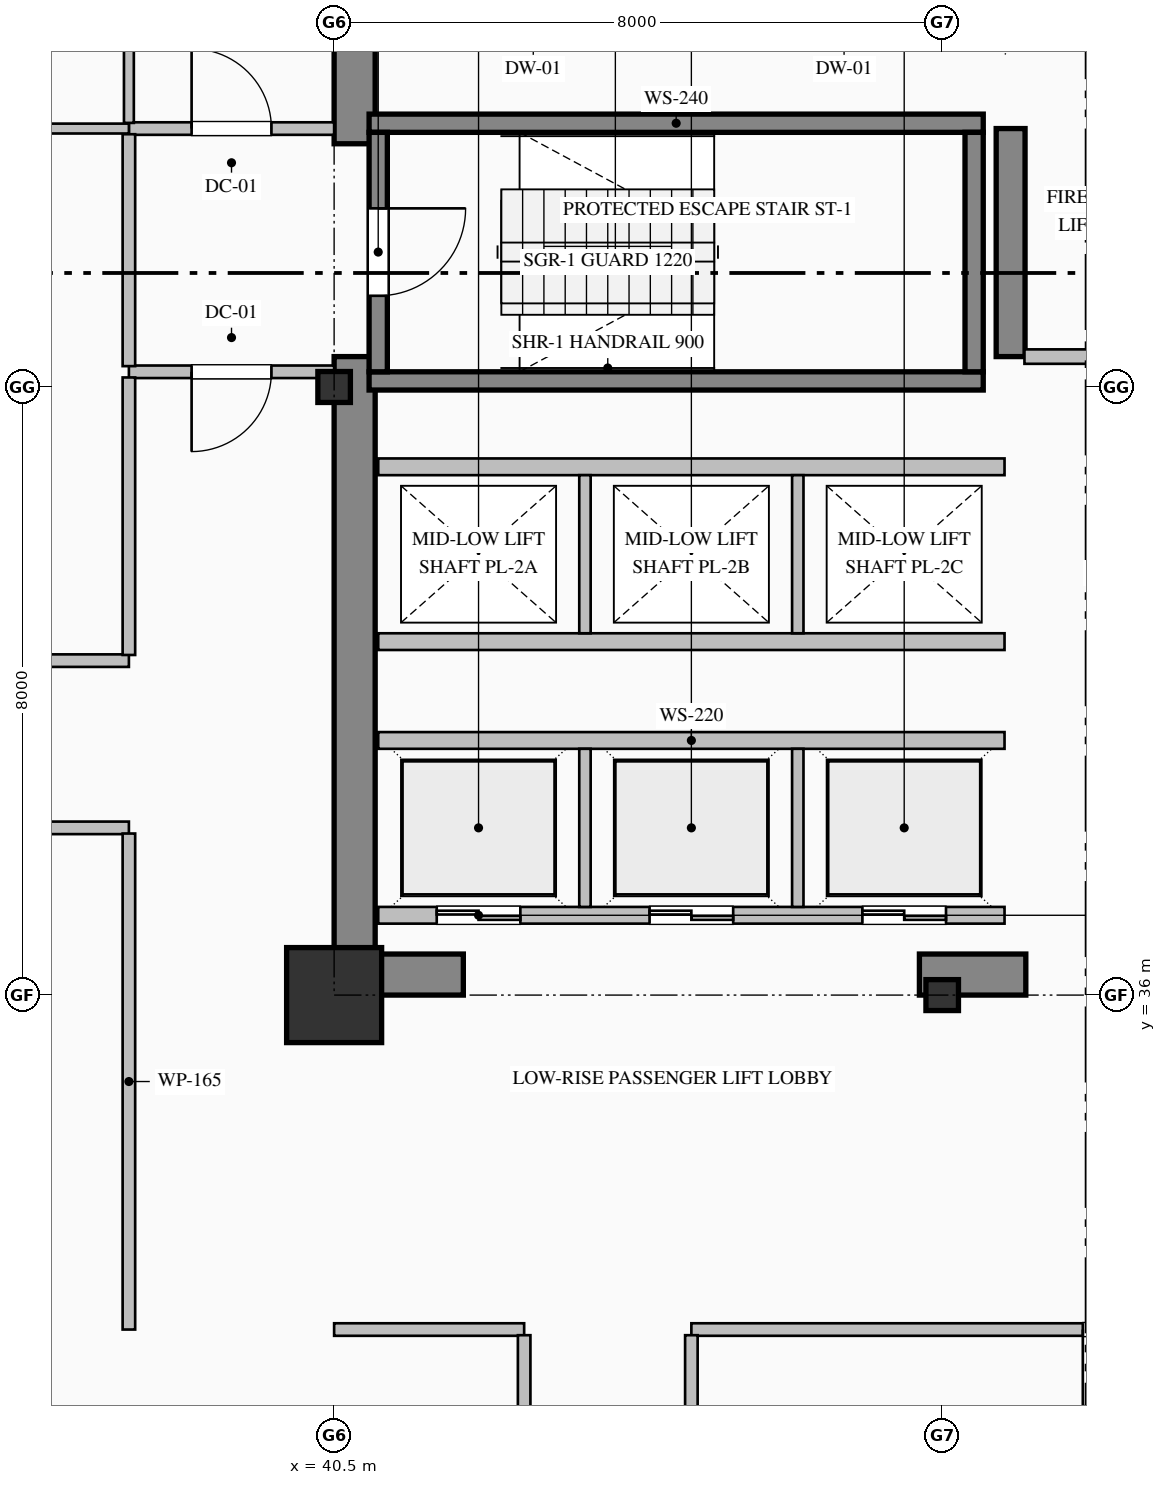
"""IFC4 building model, lengths in metres.
Left out: names, types, materials, properties, quantities, classifications, styles, units other than length and angle.
Written with IfcOpenShell. Run it as: python <this file> out.ifc"""

import sys

from ifc_helpers import new_model, si_unit, direction, frame, frame_2d, origin, origin_2d, place, context, subcontext, project, spatial, rectangle, hollow_rectangle, i_section, extrude, element, fill, save


model = new_model("IFC4")
c1 = context("Model", 3, precision=1e-05, world=origin(), true_north=direction((0.0, 1.0)))
c2 = subcontext(c1, "Body", "Model", "MODEL_VIEW")
j1 = project(units=[si_unit("LENGTHUNIT", "METRE"), si_unit("PLANEANGLEUNIT", "RADIAN")], contexts=[c1])
p1 = place(None, origin())
s1 = spatial("IfcSite", under=j1, at=p1, CompositionType="ELEMENT")
p2 = place(p1, origin())
s2 = spatial("IfcBuilding", under=s1, at=p2, CompositionType="ELEMENT")
p3 = place(p2, frame((0.0, 0.0, 36.2)))
s3 = spatial("IfcBuildingStorey", under=s2, at=p3, CompositionType="ELEMENT", Elevation=36.2)
p4 = place(p3, frame((40.77, 36.54, 0.0), z_axis=(0.0, 0.0, 1.0), x_axis=(0.0, 1.0, 0.0)))
e1 = element("IfcWall", 1, at=p4, inside=s3, PredefinedType="SHEAR", context=c2, shape_type="SweptSolid", body=[
    extrude(rectangle(XDim=7.86, YDim=0.54, at=frame_2d((3.93, 0.0))), origin(), (0.0, 0.0, 1.0), 3.75),
])
p5 = place(p3, frame((40.77, 47.2, 0.0), z_axis=(0.0, 0.0, 1.0), x_axis=(0.0, 1.0, 0.0)))
e2 = element("IfcWall", 2, at=p5, inside=s3, PredefinedType="SHEAR", context=c2, shape_type="SweptSolid", body=[
    extrude(rectangle(XDim=4.26, YDim=0.54, at=frame_2d((2.13, 0.0))), origin(), (0.0, 0.0, 1.0), 3.75),
])
p6 = place(p3, frame((40.5, 36.27, 0.0), z_axis=(0.0, 0.0, 1.0), x_axis=(1.0, 0.0, 0.0)))
e3 = element("IfcWall", 3, at=p6, inside=s3, PredefinedType="SHEAR", context=c2, shape_type="SweptSolid", body=[
    extrude(rectangle(XDim=1.7, YDim=0.54, at=frame_2d((0.85, 0.0))), origin(), (0.0, 0.0, 1.0), 3.75),
])
p7 = place(p3, frame((48.2, 36.27, 0.0), z_axis=(0.0, 0.0, 1.0), x_axis=(1.0, 0.0, 0.0)))
e4 = element("IfcWall", 4, at=p7, inside=s3, PredefinedType="SHEAR", context=c2, shape_type="SweptSolid", body=[
    extrude(rectangle(XDim=1.4, YDim=0.54, at=frame_2d((0.7, 0.0))), origin(), (0.0, 0.0, 1.0), 3.75),
])
p8 = place(p3, frame((49.4, 44.4, 0.0), z_axis=(0.0, 0.0, 1.0), x_axis=(0.0, 1.0, 0.0)))
e5 = element("IfcWall", 5, at=p8, inside=s3, PredefinedType="SHEAR", context=c2, shape_type="SweptSolid", body=[
    extrude(rectangle(XDim=3.0, YDim=0.38, at=frame_2d((1.5, 0.0))), origin(), (0.0, 0.0, 1.0), 3.75),
])
p9 = place(p3, frame((40.5, 36.0, 0.0), z_axis=(0.0, 0.0, 1.0), x_axis=(1.0, 0.0, 0.0)))
e6 = element("IfcColumn", 6, at=p9, inside=s3, PredefinedType="COLUMN", context=c2, shape_type="SweptSolid", body=[
    extrude(hollow_rectangle(XDim=1.25, YDim=1.25, WallThickness=0.045, at=origin_2d()), origin(), (0.0, 0.0, 1.0), 4.0),
])
for number, where, z_axis, x_axis in (
    (7, (40.5, 44.0, 0.0), (0.0, 0.0, 1.0), (1.0, 0.0, 0.0)),
    (8, (48.5, 36.0, 0.0), (0.0, 0.0, 1.0), (1.0, 0.0, 0.0)),
):
    element("IfcColumn", number, at=place(p3, frame(where, z_axis=z_axis, x_axis=x_axis)), inside=s3, PredefinedType="COLUMN", context=c2, shape_type="SweptSolid", body=[
        extrude(i_section(OverallWidth=0.407, OverallDepth=0.428, WebThickness=0.02, FlangeThickness=0.035, FilletRadius=0.022, at=origin_2d()), origin(), (0.0, 0.0, 1.0), 4.0),
    ])
for number, where, z_axis, x_axis in (
    (9, (40.96, 47.47, 0.0), (0.0, 0.0, 1.0), (1.0, 0.0, 0.0)),
    (10, (49.04, 44.08, 0.0), (0.0, 0.0, 1.0), (-1.0, 0.0, 0.0)),
):
    element("IfcWall", number, at=place(p3, frame(where, z_axis=z_axis, x_axis=x_axis)), inside=s3, PredefinedType="SOLIDWALL", context=c2, shape_type="SweptSolid", body=[
        extrude(rectangle(XDim=8.08, YDim=0.24, at=frame_2d((4.04, 0.0))), origin(), (0.0, 0.0, 1.0), 4.0),
    ])
p10 = place(p3, frame((41.08, 47.35, 0.0), z_axis=(0.0, 0.0, 1.0), x_axis=(0.0, -1.0, 0.0)))
e11 = element("IfcWall", 11, at=p10, inside=s3, PredefinedType="SOLIDWALL", context=c2, shape_type="SweptSolid", body=[
    extrude(rectangle(XDim=3.15, YDim=0.24, at=frame_2d((1.575, 0.0))), origin(), (0.0, 0.0, 1.0), 4.0),
])
p11 = place(p10, frame((1.0, 0.0, 0.0)))
e12 = element("IfcOpeningElement", 12, at=p11, cuts=e11, PredefinedType="OPENING", context=c2, shape_type="SweptSolid", body=[
    extrude(rectangle(XDim=1.15, YDim=2.2, at=frame_2d((0.575, 1.1))), frame((0.0, 0.13, 0.0), z_axis=(0.0, -1.0, 0.0), x_axis=(1.0, 0.0, 0.0)), (0.0, 0.0, 1.0), 0.26),
])
p12 = place(p3, frame((48.92, 44.2, 0.0), z_axis=(0.0, 0.0, 1.0), x_axis=(0.0, 1.0, 0.0)))
e13 = element("IfcWall", 13, at=p12, inside=s3, PredefinedType="SOLIDWALL", context=c2, shape_type="SweptSolid", body=[
    extrude(rectangle(XDim=3.15, YDim=0.24, at=frame_2d((1.575, 0.0))), origin(), (0.0, 0.0, 1.0), 4.0),
])
p13 = place(p3, frame((49.32, 37.05, 0.0), z_axis=(0.0, 0.0, 1.0), x_axis=(-1.0, 0.0, 0.0)))
e14 = element("IfcWall", 14, at=p13, inside=s3, PredefinedType="PARTITIONING", context=c2, shape_type="SweptSolid", body=[
    extrude(rectangle(XDim=8.24, YDim=0.22, at=frame_2d((4.12, 0.0))), origin(), (0.0, 0.0, 1.0), 3.75),
])
p14 = place(p13, frame((6.37, 0.0, 0.0)))
e15 = element("IfcOpeningElement", 15, at=p14, cuts=e14, PredefinedType="OPENING", context=c2, shape_type="SweptSolid", body=[
    extrude(rectangle(XDim=1.1, YDim=2.2, at=frame_2d((0.55, 1.1))), frame((0.0, 0.12, 0.0), z_axis=(0.0, -1.0, 0.0), x_axis=(1.0, 0.0, 0.0)), (0.0, 0.0, 1.0), 0.24),
])
p15 = place(p13, frame((3.57, 0.0, 0.0)))
e16 = element("IfcOpeningElement", 16, at=p15, cuts=e14, PredefinedType="OPENING", context=c2, shape_type="SweptSolid", body=[
    extrude(rectangle(XDim=1.1, YDim=2.2, at=frame_2d((0.55, 1.1))), frame((0.0, 0.12, 0.0), z_axis=(0.0, -1.0, 0.0), x_axis=(1.0, 0.0, 0.0)), (0.0, 0.0, 1.0), 0.24),
])
p16 = place(p13, frame((0.77, 0.0, 0.0)))
e17 = element("IfcOpeningElement", 17, at=p16, cuts=e14, PredefinedType="OPENING", context=c2, shape_type="SweptSolid", body=[
    extrude(rectangle(XDim=1.1, YDim=2.2, at=frame_2d((0.55, 1.1))), frame((0.0, 0.12, 0.0), z_axis=(0.0, -1.0, 0.0), x_axis=(1.0, 0.0, 0.0)), (0.0, 0.0, 1.0), 0.24),
])
p17 = place(p3, frame((41.08, 39.35, 0.0), z_axis=(0.0, 0.0, 1.0), x_axis=(1.0, 0.0, 0.0)))
e18 = element("IfcWall", 18, at=p17, inside=s3, PredefinedType="PARTITIONING", context=c2, shape_type="SweptSolid", body=[
    extrude(rectangle(XDim=8.24, YDim=0.22, at=frame_2d((4.12, 0.0))), origin(), (0.0, 0.0, 1.0), 3.75),
])
for number, where, z_axis, x_axis in (
    (19, (43.8, 37.16, 0.0), (0.0, 0.0, 1.0), (0.0, 1.0, 0.0)),
    (20, (46.6, 37.16, 0.0), (0.0, 0.0, 1.0), (0.0, 1.0, 0.0)),
):
    element("IfcWall", number, at=place(p3, frame(where, z_axis=z_axis, x_axis=x_axis)), inside=s3, PredefinedType="PARTITIONING", context=c2, shape_type="SweptSolid", body=[
        extrude(rectangle(XDim=2.08, YDim=0.15, at=frame_2d((1.04, 0.0))), origin(), (0.0, 0.0, 1.0), 3.75),
    ])
for number, where, z_axis, x_axis in (
    (21, (49.32, 40.65, 0.0), (0.0, 0.0, 1.0), (-1.0, 0.0, 0.0)),
    (22, (41.08, 42.95, 0.0), (0.0, 0.0, 1.0), (1.0, 0.0, 0.0)),
):
    element("IfcWall", number, at=place(p3, frame(where, z_axis=z_axis, x_axis=x_axis)), inside=s3, PredefinedType="PARTITIONING", context=c2, shape_type="SweptSolid", body=[
        extrude(rectangle(XDim=8.24, YDim=0.22, at=frame_2d((4.12, 0.0))), origin(), (0.0, 0.0, 1.0), 3.75),
    ])
for number, where, z_axis, x_axis in (
    (23, (43.8, 40.76, 0.0), (0.0, 0.0, 1.0), (0.0, 1.0, 0.0)),
    (24, (46.6, 40.76, 0.0), (0.0, 0.0, 1.0), (0.0, 1.0, 0.0)),
):
    element("IfcWall", number, at=place(p3, frame(where, z_axis=z_axis, x_axis=x_axis)), inside=s3, PredefinedType="PARTITIONING", context=c2, shape_type="SweptSolid", body=[
        extrude(rectangle(XDim=2.08, YDim=0.15, at=frame_2d((1.04, 0.0))), origin(), (0.0, 0.0, 1.0), 3.75),
    ])
p18 = place(p3, frame((37.8, 47.4, 0.0), z_axis=(0.0, 0.0, 1.0), x_axis=(1.0, 0.0, 0.0)))
e25 = element("IfcWall", 25, at=p18, inside=s3, PredefinedType="PARTITIONING", context=c2, shape_type="SweptSolid", body=[
    extrude(rectangle(XDim=2.7, YDim=0.165, at=frame_2d((1.35, 0.0))), origin(), (0.0, 0.0, 1.0), 3.75),
])
p19 = place(p18, frame((0.825, 0.0, 0.0)))
e26 = element("IfcOpeningElement", 26, at=p19, cuts=e25, PredefinedType="OPENING", context=c2, shape_type="SweptSolid", body=[
    extrude(rectangle(XDim=1.05, YDim=2.15, at=frame_2d((0.525, 1.075))), frame((0.0, 0.093, 0.0), z_axis=(0.0, -1.0, 0.0), x_axis=(1.0, 0.0, 0.0)), (0.0, 0.0, 1.0), 0.185),
])
p20 = place(p3, frame((40.5, 44.2, 0.0), z_axis=(0.0, 0.0, 1.0), x_axis=(-1.0, 0.0, 0.0)))
e27 = element("IfcWall", 27, at=p20, inside=s3, PredefinedType="PARTITIONING", context=c2, shape_type="SweptSolid", body=[
    extrude(rectangle(XDim=2.7, YDim=0.165, at=frame_2d((1.35, 0.0))), origin(), (0.0, 0.0, 1.0), 3.75),
])
p21 = place(p20, frame((0.825, 0.0, 0.0)))
e28 = element("IfcOpeningElement", 28, at=p21, cuts=e27, PredefinedType="OPENING", context=c2, shape_type="SweptSolid", body=[
    extrude(rectangle(XDim=1.05, YDim=2.15, at=frame_2d((0.525, 1.075))), frame((0.0, 0.093, 0.0), z_axis=(0.0, -1.0, 0.0), x_axis=(1.0, 0.0, 0.0)), (0.0, 0.0, 1.0), 0.185),
])
p22 = place(p3, frame((37.8, 44.274, 0.0), z_axis=(0.0, 0.0, 1.0), x_axis=(0.0, 1.0, 0.0)))
e29 = element("IfcWall", 29, at=p22, inside=s3, PredefinedType="PARTITIONING", context=c2, shape_type="SweptSolid", body=[
    extrude(rectangle(XDim=3.051, YDim=0.165, at=frame_2d((1.525, 0.0))), origin(), (0.0, 0.0, 1.0), 3.75),
])
p23 = place(p3, frame((37.8, 47.475, 0.0), z_axis=(0.0, 0.0, 1.0), x_axis=(0.0, 1.0, 0.0)))
e30 = element("IfcWall", 30, at=p23, inside=s3, PredefinedType="PARTITIONING", context=c2, shape_type="SweptSolid", body=[
    extrude(rectangle(XDim=4.173, YDim=0.13, at=frame_2d((2.087, 0.0))), origin(), (0.0, 0.0, 1.0), 3.75),
])
p24 = place(p23, frame((1.577, 0.0, 0.0)))
e31 = element("IfcOpeningElement", 31, at=p24, cuts=e30, PredefinedType="OPENING", context=c2, shape_type="SweptSolid", body=[
    extrude(rectangle(XDim=1.02, YDim=2.15, at=frame_2d((0.51, 1.075))), frame((0.0, 0.075, 0.0), z_axis=(0.0, -1.0, 0.0), x_axis=(1.0, 0.0, 0.0)), (0.0, 0.0, 1.0), 0.15),
])
p25 = place(p3, frame((37.8, 47.4, 0.0), z_axis=(0.0, 0.0, 1.0), x_axis=(-1.0, 0.0, 0.0)))
e32 = element("IfcWall", 32, at=p25, inside=s3, PredefinedType="PARTITIONING", context=c2, shape_type="SweptSolid", body=[
    extrude(rectangle(XDim=2.4, YDim=0.13, at=frame_2d((1.2, 0.0))), origin(), (0.0, 0.0, 1.0), 3.75),
])
p26 = place(p3, frame((54.718, 44.4, 0.0), z_axis=(0.0, 0.0, 1.0), x_axis=(-1.0, 0.0, 0.0)))
e33 = element("IfcWall", 33, at=p26, inside=s3, PredefinedType="PARTITIONING", context=c2, shape_type="SweptSolid", body=[
    extrude(rectangle(XDim=5.136, YDim=0.19, at=frame_2d((2.568, 0.0))), origin(), (0.0, 0.0, 1.0), 3.75),
])
p27 = place(p26, frame((2.043, 0.0, 0.0)))
e34 = element("IfcOpeningElement", 34, at=p27, cuts=e33, PredefinedType="OPENING", context=c2, shape_type="SweptSolid", body=[
    extrude(rectangle(XDim=1.05, YDim=2.15, at=frame_2d((0.525, 1.075))), frame((0.0, 0.105, 0.0), z_axis=(0.0, -1.0, 0.0), x_axis=(1.0, 0.0, 0.0)), (0.0, 0.0, 1.0), 0.21),
])
p28 = place(p3, frame((37.8, 38.2, 0.0), z_axis=(0.0, 0.0, 1.0), x_axis=(-1.0, 0.0, 0.0)))
e35 = element("IfcWall", 35, at=p28, inside=s3, PredefinedType="PARTITIONING", context=c2, shape_type="SweptSolid", body=[
    extrude(rectangle(XDim=28.8, YDim=0.165, at=frame_2d((14.4, 0.0))), origin(), (0.0, 0.0, 1.0), 3.75),
])
p29 = place(p28, frame((13.9, 0.0, 0.0)))
e36 = element("IfcOpeningElement", 36, at=p29, cuts=e35, PredefinedType="OPENING", context=c2, shape_type="SweptSolid", body=[
    extrude(rectangle(XDim=1.0, YDim=2.15, at=frame_2d((0.5, 1.075))), frame((0.0, 0.093, 0.0), z_axis=(0.0, -1.0, 0.0), x_axis=(1.0, 0.0, 0.0)), (0.0, 0.0, 1.0), 0.185),
])
p30 = place(p3, frame((32.5, 40.4, 0.0), z_axis=(0.0, 0.0, 1.0), x_axis=(1.0, 0.0, 0.0)))
e37 = element("IfcWall", 37, at=p30, inside=s3, PredefinedType="PARTITIONING", context=c2, shape_type="SweptSolid", body=[
    extrude(rectangle(XDim=5.3, YDim=0.165, at=frame_2d((2.65, 0.0))), origin(), (0.0, 0.0, 1.0), 3.75),
])
p31 = place(p30, frame((2.15, 0.0, 0.0)))
e38 = element("IfcOpeningElement", 38, at=p31, cuts=e37, PredefinedType="OPENING", context=c2, shape_type="SweptSolid", body=[
    extrude(rectangle(XDim=1.0, YDim=2.15, at=frame_2d((0.5, 1.075))), frame((0.0, 0.093, 0.0), z_axis=(0.0, -1.0, 0.0), x_axis=(1.0, 0.0, 0.0)), (0.0, 0.0, 1.0), 0.185),
])
p32 = place(p3, frame((37.8, 31.6, 0.0), z_axis=(0.0, 0.0, 1.0), x_axis=(0.0, 1.0, 0.0)))
e39 = element("IfcWall", 39, at=p32, inside=s3, PredefinedType="PARTITIONING", context=c2, shape_type="SweptSolid", body=[
    extrude(rectangle(XDim=6.525, YDim=0.165, at=frame_2d((3.263, 0.0))), origin(), (0.0, 0.0, 1.0), 3.75),
])
p33 = place(p3, frame((37.8, 40.475, 0.0), z_axis=(0.0, 0.0, 1.0), x_axis=(0.0, 1.0, 0.0)))
e40 = element("IfcWall", 40, at=p33, inside=s3, PredefinedType="PARTITIONING", context=c2, shape_type="SweptSolid", body=[
    extrude(rectangle(XDim=3.651, YDim=0.165, at=frame_2d((1.825, 0.0))), origin(), (0.0, 0.0, 1.0), 3.75),
])
p34 = place(p3, frame((56.5, 31.6, 0.0), z_axis=(0.0, 0.0, 1.0), x_axis=(-1.0, 0.0, 0.0)))
e41 = element("IfcWall", 41, at=p34, inside=s3, PredefinedType="PARTITIONING", context=c2, shape_type="SweptSolid", body=[
    extrude(rectangle(XDim=11.3, YDim=0.165, at=frame_2d((5.65, 0.0))), origin(), (0.0, 0.0, 1.0), 3.75),
])
p35 = place(p34, frame((5.15, 0.0, 0.0)))
e42 = element("IfcOpeningElement", 42, at=p35, cuts=e41, PredefinedType="OPENING", context=c2, shape_type="SweptSolid", body=[
    extrude(rectangle(XDim=1.0, YDim=2.15, at=frame_2d((0.5, 1.075))), frame((0.0, 0.093, 0.0), z_axis=(0.0, -1.0, 0.0), x_axis=(1.0, 0.0, 0.0)), (0.0, 0.0, 1.0), 0.185),
])
p36 = place(p3, frame((43.0, 31.6, 0.0), z_axis=(0.0, 0.0, 1.0), x_axis=(-1.0, 0.0, 0.0)))
e43 = element("IfcWall", 43, at=p36, inside=s3, PredefinedType="PARTITIONING", context=c2, shape_type="SweptSolid", body=[
    extrude(rectangle(XDim=2.5, YDim=0.165, at=frame_2d((1.25, 0.0))), origin(), (0.0, 0.0, 1.0), 3.75),
])
p37 = place(p3, frame((45.2, 31.525, 0.0), z_axis=(0.0, 0.0, 1.0), x_axis=(0.0, -1.0, 0.0)))
e44 = element("IfcWall", 44, at=p37, inside=s3, PredefinedType="PARTITIONING", context=c2, shape_type="SweptSolid", body=[
    extrude(rectangle(XDim=3.461, YDim=0.165, at=frame_2d((1.73, 0.0))), origin(), (0.0, 0.0, 1.0), 3.75),
])
p38 = place(p3, frame((43.0, 28.064, 0.0), z_axis=(0.0, 0.0, 1.0), x_axis=(0.0, 1.0, 0.0)))
e45 = element("IfcWall", 45, at=p38, inside=s3, PredefinedType="PARTITIONING", context=c2, shape_type="SweptSolid", body=[
    extrude(rectangle(XDim=3.461, YDim=0.165, at=frame_2d((1.73, 0.0))), origin(), (0.0, 0.0, 1.0), 3.75),
])
p39 = place(p38, frame((1.23, 0.0, 0.0)))
e46 = element("IfcOpeningElement", 46, at=p39, cuts=e45, PredefinedType="OPENING", context=c2, shape_type="SweptSolid", body=[
    extrude(rectangle(XDim=1.0, YDim=2.15, at=frame_2d((0.5, 1.075))), frame((0.0, 0.093, 0.0), z_axis=(0.0, -1.0, 0.0), x_axis=(1.0, 0.0, 0.0)), (0.0, 0.0, 1.0), 0.185),
])
p40 = place(p11, origin())
e47 = element("IfcDoor", 47, at=p40, inside=s3, OperationType="SINGLE_SWING_LEFT", PredefinedType="DOOR", context=c2, shape_type="SweptSolid", body=[
    extrude(rectangle(XDim=1.15, YDim=2.2, at=frame_2d((0.575, 1.1))), frame((0.0, 0.025, 0.0), z_axis=(0.0, -1.0, 0.0), x_axis=(1.0, 0.0, 0.0)), (0.0, 0.0, 1.0), 0.05),
])
fill(e12, e47)
p41 = place(p14, origin())
e48 = element("IfcDoor", 48, at=p41, inside=s3, OperationType="DOUBLE_DOOR_SLIDING", PredefinedType="DOOR", context=c2, shape_type="SweptSolid", body=[
    extrude(rectangle(XDim=1.1, YDim=2.2, at=frame_2d((0.55, 1.1))), frame((0.0, 0.025, 0.0), z_axis=(0.0, -1.0, 0.0), x_axis=(1.0, 0.0, 0.0)), (0.0, 0.0, 1.0), 0.05),
])
fill(e15, e48)
p42 = place(p15, origin())
e49 = element("IfcDoor", 49, at=p42, inside=s3, OperationType="DOUBLE_DOOR_SLIDING", PredefinedType="DOOR", context=c2, shape_type="SweptSolid", body=[
    extrude(rectangle(XDim=1.1, YDim=2.2, at=frame_2d((0.55, 1.1))), frame((0.0, 0.025, 0.0), z_axis=(0.0, -1.0, 0.0), x_axis=(1.0, 0.0, 0.0)), (0.0, 0.0, 1.0), 0.05),
])
fill(e16, e49)
p43 = place(p16, origin())
e50 = element("IfcDoor", 50, at=p43, inside=s3, OperationType="DOUBLE_DOOR_SLIDING", PredefinedType="DOOR", context=c2, shape_type="SweptSolid", body=[
    extrude(rectangle(XDim=1.1, YDim=2.2, at=frame_2d((0.55, 1.1))), frame((0.0, 0.025, 0.0), z_axis=(0.0, -1.0, 0.0), x_axis=(1.0, 0.0, 0.0)), (0.0, 0.0, 1.0), 0.05),
])
fill(e17, e50)
p44 = place(p19, origin())
e51 = element("IfcDoor", 51, at=p44, inside=s3, OperationType="SINGLE_SWING_LEFT", PredefinedType="DOOR", context=c2, shape_type="SweptSolid", body=[
    extrude(rectangle(XDim=1.05, YDim=2.15, at=frame_2d((0.525, 1.075))), frame((0.0, 0.025, 0.0), z_axis=(0.0, -1.0, 0.0), x_axis=(1.0, 0.0, 0.0)), (0.0, 0.0, 1.0), 0.05),
])
fill(e26, e51)
p45 = place(p21, origin())
e52 = element("IfcDoor", 52, at=p45, inside=s3, OperationType="SINGLE_SWING_RIGHT", PredefinedType="DOOR", context=c2, shape_type="SweptSolid", body=[
    extrude(rectangle(XDim=1.05, YDim=2.15, at=frame_2d((0.525, 1.075))), frame((0.0, 0.025, 0.0), z_axis=(0.0, -1.0, 0.0), x_axis=(1.0, 0.0, 0.0)), (0.0, 0.0, 1.0), 0.05),
])
fill(e28, e52)
p46 = place(p35, origin())
e53 = element("IfcDoor", 53, at=p46, inside=s3, OperationType="SINGLE_SWING_RIGHT", PredefinedType="DOOR", context=c2, shape_type="SweptSolid", body=[
    extrude(rectangle(XDim=1.0, YDim=2.15, at=frame_2d((0.5, 1.075))), frame((0.0, 0.025, 0.0), z_axis=(0.0, -1.0, 0.0), x_axis=(1.0, 0.0, 0.0)), (0.0, 0.0, 1.0), 0.05),
])
fill(e42, e53)
save(model, sys.argv[1])
